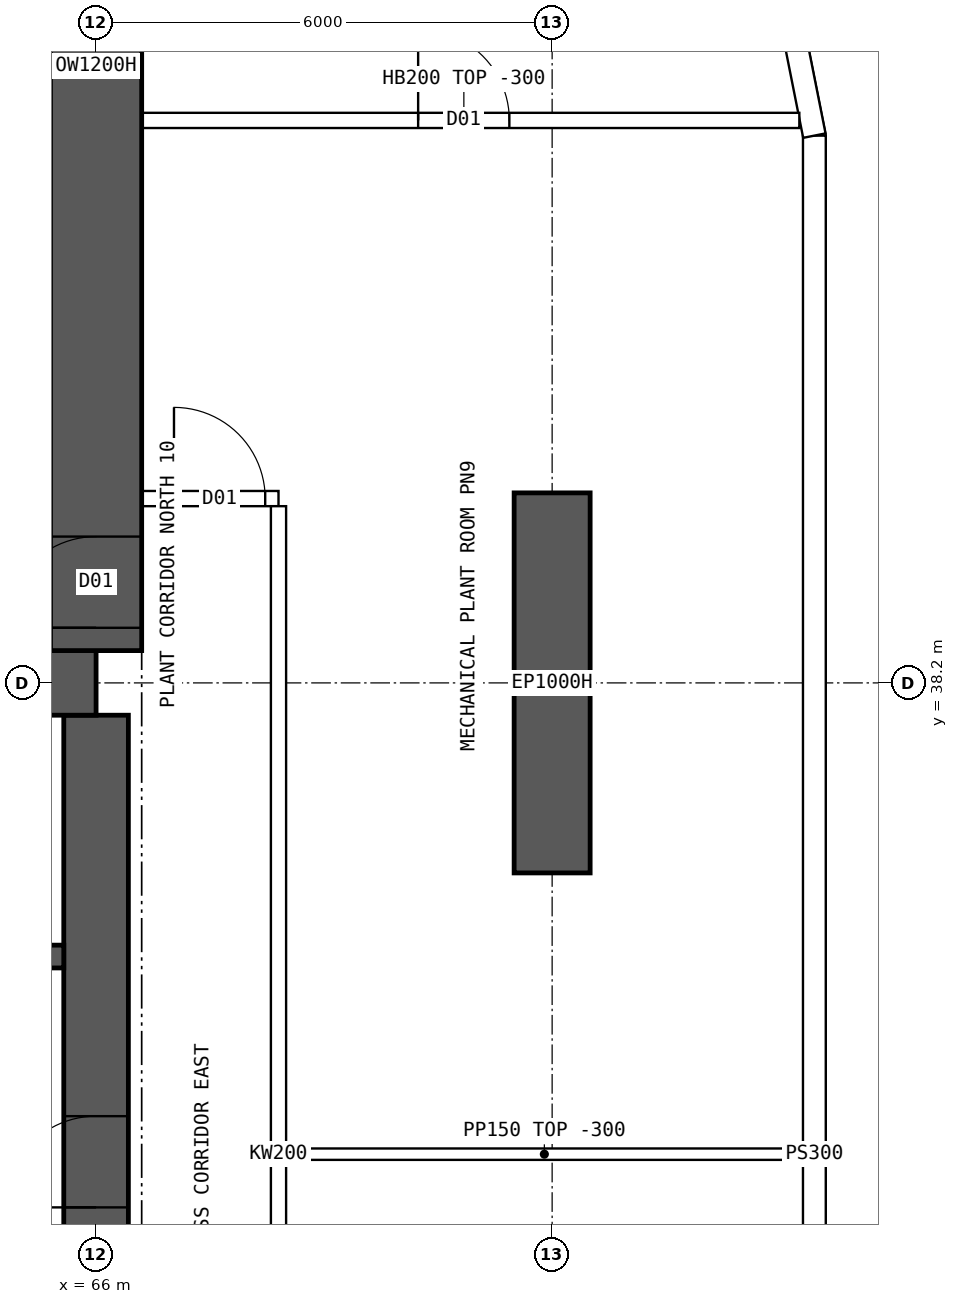
"""IFC4 building model, lengths in metres.
Left out: names, types, materials, properties, quantities, classifications, styles, units other than length and angle.
Written with IfcOpenShell. Run it as: python <this file> out.ifc"""

import sys

from ifc_helpers import new_model, si_unit, direction, frame, frame_2d, origin, place, context, subcontext, project, spatial, polyline, rectangle, outline, extrude, clip, halfspace, element, fill, save


model = new_model("IFC4")
c1 = context("Model", 3, precision=1e-05, world=origin(), true_north=direction((0.0, 1.0)))
c2 = subcontext(c1, "Body", "Model", "MODEL_VIEW")
j1 = project(units=[si_unit("LENGTHUNIT", "METRE"), si_unit("PLANEANGLEUNIT", "RADIAN")], contexts=[c1])
p1 = place(None, origin())
s1 = spatial("IfcSite", under=j1, at=p1, CompositionType="ELEMENT")
p2 = place(p1, origin())
s2 = spatial("IfcBuilding", under=s1, at=p2, CompositionType="ELEMENT")
p3 = place(p2, frame((0.0, 0.0, 201.1)))
s3 = spatial("IfcBuildingStorey", under=s2, at=p3, CompositionType="ELEMENT", Elevation=201.1)
p4 = place(p3, frame((72.0, 35.7, 0.0), z_axis=(0.0, 0.0, 1.0), x_axis=(0.0, 1.0, 0.0)))
e1 = element("IfcWall", 1, at=p4, inside=s3, PredefinedType="SHEAR", context=c2, shape_type="SweptSolid", body=[
    extrude(rectangle(XDim=5.0, YDim=1.0, at=frame_2d((2.5, 0.0))), origin(), (0.0, 0.0, 1.0), 7.2),
])
p5 = place(p3, frame((18.0, 38.2, 0.0), z_axis=(0.0, 0.0, 1.0), x_axis=(1.0, 0.0, 0.0)))
e2 = element("IfcWall", 2, at=p5, inside=s3, PredefinedType="SHEAR", context=c2, shape_type="SweptSolid", body=[
    extrude(rectangle(XDim=48.0, YDim=0.85, at=frame_2d((24.0, 0.0))), origin(), (0.0, 0.0, 1.0), 7.2),
])
p6 = place(p3, frame((66.0, 26.225, 0.0), z_axis=(0.0, 0.0, 1.0), x_axis=(0.0, 1.0, 0.0)))
e3 = element("IfcWall", 3, at=p6, inside=s3, PredefinedType="SHEAR", context=c2, shape_type="SweptSolid", body=[
    extrude(rectangle(XDim=11.55, YDim=0.85, at=frame_2d((5.775, 0.0))), origin(), (0.0, 0.0, 1.0), 7.2),
])
p7 = place(p6, frame((5.075, 0.0, 0.0)))
e4 = element("IfcOpeningElement", 4, at=p7, cuts=e3, PredefinedType="OPENING", context=c2, shape_type="SweptSolid", body=[
    extrude(rectangle(XDim=1.2, YDim=2.1, at=frame_2d((0.6, 1.05))), frame((0.0, 0.435, 0.0), z_axis=(0.0, -1.0, 0.0), x_axis=(1.0, 0.0, 0.0)), (0.0, 0.0, 1.0), 0.87),
])
p8 = place(p3, frame((18.425, 34.6, 0.0), z_axis=(0.0, 0.0, 1.0), x_axis=(1.0, 0.0, 0.0)))
e5 = element("IfcWall", 5, at=p8, inside=s3, PredefinedType="SHEAR", context=c2, shape_type="SweptSolid", body=[
    extrude(rectangle(XDim=47.15, YDim=0.3, at=frame_2d((23.575, 0.0))), origin(), (0.0, 0.0, 1.0), 7.2),
])
p9 = place(p8, frame((0.9, 0.0, 0.0)))
e6 = element("IfcOpeningElement", 6, at=p9, cuts=e5, PredefinedType="OPENING", context=c2, shape_type="SweptSolid", body=[
    extrude(rectangle(XDim=1.1, YDim=2.1, at=frame_2d((0.55, 1.05))), frame((0.0, 0.16, 0.0), z_axis=(0.0, -1.0, 0.0), x_axis=(1.0, 0.0, 0.0)), (0.0, 0.0, 1.0), 0.32),
])
p10 = place(p8, frame((45.15, 0.0, 0.0)))
e7 = element("IfcOpeningElement", 7, at=p10, cuts=e5, PredefinedType="OPENING", context=c2, shape_type="SweptSolid", body=[
    extrude(rectangle(XDim=1.1, YDim=2.1, at=frame_2d((0.55, 1.05))), frame((0.0, 0.16, 0.0), z_axis=(0.0, -1.0, 0.0), x_axis=(1.0, 0.0, 0.0)), (0.0, 0.0, 1.0), 0.32),
])
p11 = place(p8, frame((4.175, 0.0, 0.0)))
e8 = element("IfcOpeningElement", 8, at=p11, cuts=e5, PredefinedType="OPENING", context=c2, shape_type="SweptSolid", body=[
    extrude(rectangle(XDim=0.9, YDim=2.1, at=frame_2d((0.45, 1.05))), frame((0.0, 0.16, 0.0), z_axis=(0.0, -1.0, 0.0), x_axis=(1.0, 0.0, 0.0)), (0.0, 0.0, 1.0), 0.32),
])
p12 = place(p8, frame((42.075, 0.0, 0.0)))
e9 = element("IfcOpeningElement", 9, at=p12, cuts=e5, PredefinedType="OPENING", context=c2, shape_type="SweptSolid", body=[
    extrude(rectangle(XDim=0.9, YDim=2.1, at=frame_2d((0.45, 1.05))), frame((0.0, 0.16, 0.0), z_axis=(0.0, -1.0, 0.0), x_axis=(1.0, 0.0, 0.0)), (0.0, 0.0, 1.0), 0.32),
])
p13 = place(p8, frame((8.95, 0.0, 0.0)))
e10 = element("IfcOpeningElement", 10, at=p13, cuts=e5, PredefinedType="OPENING", context=c2, shape_type="SweptSolid", body=[
    extrude(rectangle(XDim=0.9, YDim=2.1, at=frame_2d((0.45, 1.05))), frame((0.0, 0.16, 0.0), z_axis=(0.0, -1.0, 0.0), x_axis=(1.0, 0.0, 0.0)), (0.0, 0.0, 1.0), 0.32),
])
p14 = place(p8, frame((12.924, 0.0, 0.0)))
e11 = element("IfcOpeningElement", 11, at=p14, cuts=e5, PredefinedType="OPENING", context=c2, shape_type="SweptSolid", body=[
    extrude(rectangle(XDim=0.9, YDim=2.1, at=frame_2d((0.45, 1.05))), frame((0.0, 0.16, 0.0), z_axis=(0.0, -1.0, 0.0), x_axis=(1.0, 0.0, 0.0)), (0.0, 0.0, 1.0), 0.32),
])
p15 = place(p8, frame((16.571, 0.0, 0.0)))
e12 = element("IfcOpeningElement", 12, at=p15, cuts=e5, PredefinedType="OPENING", context=c2, shape_type="SweptSolid", body=[
    extrude(rectangle(XDim=0.9, YDim=2.1, at=frame_2d((0.45, 1.05))), frame((0.0, 0.16, 0.0), z_axis=(0.0, -1.0, 0.0), x_axis=(1.0, 0.0, 0.0)), (0.0, 0.0, 1.0), 0.32),
])
p16 = place(p8, frame((20.33, 0.0, 0.0)))
e13 = element("IfcOpeningElement", 13, at=p16, cuts=e5, PredefinedType="OPENING", context=c2, shape_type="SweptSolid", body=[
    extrude(rectangle(XDim=0.9, YDim=2.1, at=frame_2d((0.45, 1.05))), frame((0.0, 0.16, 0.0), z_axis=(0.0, -1.0, 0.0), x_axis=(1.0, 0.0, 0.0)), (0.0, 0.0, 1.0), 0.32),
])
p17 = place(p8, frame((24.736, 0.0, 0.0)))
e14 = element("IfcOpeningElement", 14, at=p17, cuts=e5, PredefinedType="OPENING", context=c2, shape_type="SweptSolid", body=[
    extrude(rectangle(XDim=0.9, YDim=2.1, at=frame_2d((0.45, 1.05))), frame((0.0, 0.16, 0.0), z_axis=(0.0, -1.0, 0.0), x_axis=(1.0, 0.0, 0.0)), (0.0, 0.0, 1.0), 0.32),
])
p18 = place(p8, frame((27.533, 0.0, 0.0)))
e15 = element("IfcOpeningElement", 15, at=p18, cuts=e5, PredefinedType="OPENING", context=c2, shape_type="SweptSolid", body=[
    extrude(rectangle(XDim=0.9, YDim=2.1, at=frame_2d((0.45, 1.05))), frame((0.0, 0.16, 0.0), z_axis=(0.0, -1.0, 0.0), x_axis=(1.0, 0.0, 0.0)), (0.0, 0.0, 1.0), 0.32),
])
p19 = place(p8, frame((29.906, 0.0, 0.0)))
e16 = element("IfcOpeningElement", 16, at=p19, cuts=e5, PredefinedType="OPENING", context=c2, shape_type="SweptSolid", body=[
    extrude(rectangle(XDim=0.9, YDim=2.1, at=frame_2d((0.45, 1.05))), frame((0.0, 0.16, 0.0), z_axis=(0.0, -1.0, 0.0), x_axis=(1.0, 0.0, 0.0)), (0.0, 0.0, 1.0), 0.32),
])
p20 = place(p8, frame((35.376, 0.0, 0.0)))
e17 = element("IfcOpeningElement", 17, at=p20, cuts=e5, PredefinedType="OPENING", context=c2, shape_type="SweptSolid", body=[
    extrude(rectangle(XDim=0.9, YDim=2.1, at=frame_2d((0.45, 1.05))), frame((0.0, 0.16, 0.0), z_axis=(0.0, -1.0, 0.0), x_axis=(1.0, 0.0, 0.0)), (0.0, 0.0, 1.0), 0.32),
])
p21 = place(p3, frame((66.0, 38.625, 0.0), z_axis=(0.0, 0.0, 1.0), x_axis=(0.0, 1.0, 0.0)))
e18 = element("IfcWall", 18, at=p21, inside=s3, PredefinedType="SHEAR", context=c2, shape_type="SweptSolid", body=[
    extrude(rectangle(XDim=15.375, YDim=1.2, at=frame_2d((7.688, 0.0))), origin(), (0.0, 0.0, 1.0), 7.2),
])
p22 = place(p21, frame((0.3, 0.0, 0.0)))
e19 = element("IfcOpeningElement", 19, at=p22, cuts=e18, PredefinedType="OPENING", context=c2, shape_type="SweptSolid", body=[
    extrude(rectangle(XDim=1.2, YDim=2.1, at=frame_2d((0.6, 1.05))), frame((0.0, 0.61, 0.0), z_axis=(0.0, -1.0, 0.0), x_axis=(1.0, 0.0, 0.0)), (0.0, 0.0, 1.0), 1.22),
])
p23 = place(p21, frame((10.225, 0.0, 0.0)))
e20 = element("IfcOpeningElement", 20, at=p23, cuts=e18, PredefinedType="OPENING", context=c2, shape_type="SweptSolid", body=[
    extrude(rectangle(XDim=1.2, YDim=2.1, at=frame_2d((0.6, 1.05))), frame((0.0, 0.61, 0.0), z_axis=(0.0, -1.0, 0.0), x_axis=(1.0, 0.0, 0.0)), (0.0, 0.0, 1.0), 1.22),
])
p24 = place(p3, frame((75.45, 18.6, 0.0), z_axis=(0.0, 0.0, 1.0), x_axis=(0.0, 1.0, 0.0)))
e21 = element("IfcWall", 21, at=p24, inside=s3, PredefinedType="SOLIDWALL", context=c2, shape_type="SweptSolid", body=[
    extrude(outline(polyline([(-0.015, -0.15), (26.815, -0.15), (26.785, 0.15), (0.015, 0.15), (-0.015, -0.15)])), origin(), (0.0, 0.0, 1.0), 6.9),
])
p25 = place(p3, frame((75.45, 45.4, 0.0), z_axis=(0.0, 0.0, 1.0), x_axis=(-0.19508664885, 0.980786011034, 0.0)))
e22 = element("IfcWall", 22, at=p25, inside=s3, PredefinedType="SOLIDWALL", context=c2, shape_type="SweptSolid", body=[
    extrude(outline(polyline([(-0.015, -0.15), (3.405, -0.15), (3.345, 0.15), (0.015, 0.15), (-0.015, -0.15)])), origin(), (0.0, 0.0, 1.0), 6.9),
])
p26 = place(p3, frame((15.6, 40.625, 0.0), z_axis=(0.0, 0.0, 1.0), x_axis=(1.0, 0.0, 0.0)))
e23 = element("IfcWall", 23, at=p26, inside=s3, PredefinedType="SOLIDWALL", context=c2, shape_type="SweptSolid", body=[
    extrude(rectangle(XDim=52.8, YDim=0.2, at=frame_2d((26.4, 0.0))), origin(), (0.0, 0.0, 1.0), 6.9),
])
p27 = place(p26, frame((0.6, 0.0, 0.0)))
e24 = element("IfcOpeningElement", 24, at=p27, cuts=e23, PredefinedType="OPENING", context=c2, shape_type="SweptSolid", body=[
    extrude(rectangle(XDim=1.2, YDim=2.1, at=frame_2d((0.6, 1.05))), frame((0.0, 0.11, 0.0), z_axis=(0.0, -1.0, 0.0), x_axis=(1.0, 0.0, 0.0)), (0.0, 0.0, 1.0), 0.22),
])
p28 = place(p26, frame((3.425, 0.0, 0.0)))
e25 = element("IfcOpeningElement", 25, at=p28, cuts=e23, PredefinedType="OPENING", context=c2, shape_type="SweptSolid", body=[
    extrude(rectangle(XDim=1.8, YDim=2.4, at=frame_2d((0.9, 1.2))), frame((0.0, 0.11, 0.0), z_axis=(0.0, -1.0, 0.0), x_axis=(1.0, 0.0, 0.0)), (0.0, 0.0, 1.0), 0.22),
])
p29 = place(p26, frame((9.425, 0.0, 0.0)))
e26 = element("IfcOpeningElement", 26, at=p29, cuts=e23, PredefinedType="OPENING", context=c2, shape_type="SweptSolid", body=[
    extrude(rectangle(XDim=1.8, YDim=2.4, at=frame_2d((0.9, 1.2))), frame((0.0, 0.11, 0.0), z_axis=(0.0, -1.0, 0.0), x_axis=(1.0, 0.0, 0.0)), (0.0, 0.0, 1.0), 0.22),
])
p30 = place(p26, frame((15.425, 0.0, 0.0)))
e27 = element("IfcOpeningElement", 27, at=p30, cuts=e23, PredefinedType="OPENING", context=c2, shape_type="SweptSolid", body=[
    extrude(rectangle(XDim=1.8, YDim=2.4, at=frame_2d((0.9, 1.2))), frame((0.0, 0.11, 0.0), z_axis=(0.0, -1.0, 0.0), x_axis=(1.0, 0.0, 0.0)), (0.0, 0.0, 1.0), 0.22),
])
p31 = place(p26, frame((21.425, 0.0, 0.0)))
e28 = element("IfcOpeningElement", 28, at=p31, cuts=e23, PredefinedType="OPENING", context=c2, shape_type="SweptSolid", body=[
    extrude(rectangle(XDim=1.8, YDim=2.4, at=frame_2d((0.9, 1.2))), frame((0.0, 0.11, 0.0), z_axis=(0.0, -1.0, 0.0), x_axis=(1.0, 0.0, 0.0)), (0.0, 0.0, 1.0), 0.22),
])
p32 = place(p26, frame((27.425, 0.0, 0.0)))
e29 = element("IfcOpeningElement", 29, at=p32, cuts=e23, PredefinedType="OPENING", context=c2, shape_type="SweptSolid", body=[
    extrude(rectangle(XDim=1.8, YDim=2.4, at=frame_2d((0.9, 1.2))), frame((0.0, 0.11, 0.0), z_axis=(0.0, -1.0, 0.0), x_axis=(1.0, 0.0, 0.0)), (0.0, 0.0, 1.0), 0.22),
])
p33 = place(p26, frame((33.425, 0.0, 0.0)))
e30 = element("IfcOpeningElement", 30, at=p33, cuts=e23, PredefinedType="OPENING", context=c2, shape_type="SweptSolid", body=[
    extrude(rectangle(XDim=1.8, YDim=2.4, at=frame_2d((0.9, 1.2))), frame((0.0, 0.11, 0.0), z_axis=(0.0, -1.0, 0.0), x_axis=(1.0, 0.0, 0.0)), (0.0, 0.0, 1.0), 0.22),
])
p34 = place(p26, frame((39.425, 0.0, 0.0)))
e31 = element("IfcOpeningElement", 31, at=p34, cuts=e23, PredefinedType="OPENING", context=c2, shape_type="SweptSolid", body=[
    extrude(rectangle(XDim=1.8, YDim=2.4, at=frame_2d((0.9, 1.2))), frame((0.0, 0.11, 0.0), z_axis=(0.0, -1.0, 0.0), x_axis=(1.0, 0.0, 0.0)), (0.0, 0.0, 1.0), 0.22),
])
p35 = place(p26, frame((45.425, 0.0, 0.0)))
e32 = element("IfcOpeningElement", 32, at=p35, cuts=e23, PredefinedType="OPENING", context=c2, shape_type="SweptSolid", body=[
    extrude(rectangle(XDim=1.8, YDim=2.4, at=frame_2d((0.9, 1.2))), frame((0.0, 0.11, 0.0), z_axis=(0.0, -1.0, 0.0), x_axis=(1.0, 0.0, 0.0)), (0.0, 0.0, 1.0), 0.22),
])
p36 = place(p26, frame((51.425, 0.0, 0.0)))
e33 = element("IfcOpeningElement", 33, at=p36, cuts=e23, PredefinedType="OPENING", context=c2, shape_type="SweptSolid", body=[
    extrude(rectangle(XDim=1.2, YDim=2.1, at=frame_2d((0.6, 1.05))), frame((0.0, 0.11, 0.0), z_axis=(0.0, -1.0, 0.0), x_axis=(1.0, 0.0, 0.0)), (0.0, 0.0, 1.0), 0.22),
])
p37 = place(p3, frame((68.4, 23.475, 0.0), z_axis=(0.0, 0.0, 1.0), x_axis=(0.0, 1.0, 0.0)))
e34 = element("IfcWall", 34, at=p37, inside=s3, PredefinedType="SOLIDWALL", context=c2, shape_type="SweptSolid", body=[
    extrude(rectangle(XDim=17.05, YDim=0.2, at=frame_2d((8.525, 0.0))), origin(), (0.0, 0.0, 1.0), 6.9),
])
p38 = place(p3, frame((60.425, 45.6, 0.0), z_axis=(0.0, 0.0, 1.0), x_axis=(1.0, 0.0, 0.0)))
e35 = element("IfcWall", 35, at=p38, inside=s3, PredefinedType="SOLIDWALL", context=c2, shape_type="SweptSolid", body=[
    extrude(rectangle(XDim=5.15, YDim=0.2, at=frame_2d((2.575, 0.0))), origin(), (0.0, 0.0, 1.0), 6.9),
])
p39 = place(p38, frame((1.975, 0.0, 0.0)))
e36 = element("IfcOpeningElement", 36, at=p39, cuts=e35, PredefinedType="OPENING", context=c2, shape_type="SweptSolid", body=[
    extrude(rectangle(XDim=1.2, YDim=2.1, at=frame_2d((0.6, 1.05))), frame((0.0, 0.11, 0.0), z_axis=(0.0, -1.0, 0.0), x_axis=(1.0, 0.0, 0.0)), (0.0, 0.0, 1.0), 0.22),
])
p40 = place(p3, frame((66.425, 45.6, 0.0), z_axis=(0.0, 0.0, 1.0), x_axis=(1.0, 0.0, 0.0)))
e37 = element("IfcWall", 37, at=p40, inside=s3, PredefinedType="SOLIDWALL", context=c2, shape_type="Clipping", body=[
    clip(clip(extrude(outline(polyline([(-0.03, 0.0), (8.857, 0.0), (8.857, 6.9), (5.877, 6.9), (5.875, 6.45), (5.277, 6.45), (5.275, 6.9), (-0.03, 6.9), (-0.03, 0.0)])), frame((0.0, 0.1, 0.0), z_axis=(0.0, -1.0, 0.0), x_axis=(1.0, 0.0, 0.0)), (0.0, 0.0, 1.0), 0.2), halfspace(frame((0.0, 0.0, 0.0), z_axis=(-1.0, 0.0, 0.0)), False)), halfspace(frame((8.827, 0.0, 0.0), z_axis=(0.980787601265, 0.195078653892, 0.0)), False)),
])
p41 = place(p40, frame((3.812, 0.0, 0.0)))
e38 = element("IfcOpeningElement", 38, at=p41, cuts=e37, PredefinedType="OPENING", context=c2, shape_type="SweptSolid", body=[
    extrude(rectangle(XDim=1.2, YDim=2.1, at=frame_2d((0.6, 1.05))), frame((0.0, 0.11, 0.0), z_axis=(0.0, -1.0, 0.0), x_axis=(1.0, 0.0, 0.0)), (0.0, 0.0, 1.0), 0.22),
])
p42 = place(p3, frame((68.5, 32.0, 0.0), z_axis=(0.0, 0.0, 1.0), x_axis=(1.0, 0.0, 0.0)))
e39 = element("IfcWall", 39, at=p42, inside=s3, PredefinedType="PARTITIONING", context=c2, shape_type="SweptSolid", body=[
    extrude(outline(polyline([(0.0, 0.0), (6.795, 0.0), (6.795, 6.9), (3.802, 6.9), (3.8, 6.45), (3.202, 6.45), (3.2, 6.9), (0.0, 6.9), (0.0, 0.0)])), frame((0.0, 0.075, 0.0), z_axis=(0.0, -1.0, 0.0), x_axis=(1.0, 0.0, 0.0)), (0.0, 0.0, 1.0), 0.15),
])
p43 = place(p7, origin())
e40 = element("IfcDoor", 40, at=p43, inside=s3, OperationType="SINGLE_SWING_LEFT", PredefinedType="DOOR", context=c2, shape_type="SweptSolid", body=[
    extrude(rectangle(XDim=1.2, YDim=2.1, at=frame_2d((0.6, 1.05))), frame((0.0, 0.025, 0.0), z_axis=(0.0, -1.0, 0.0), x_axis=(1.0, 0.0, 0.0)), (0.0, 0.0, 1.0), 0.05),
])
fill(e4, e40)
p44 = place(p41, origin())
e41 = element("IfcDoor", 41, at=p44, inside=s3, OperationType="SINGLE_SWING_LEFT", PredefinedType="DOOR", context=c2, shape_type="SweptSolid", body=[
    extrude(rectangle(XDim=1.2, YDim=2.1, at=frame_2d((0.6, 1.05))), frame((0.0, 0.025, 0.0), z_axis=(0.0, -1.0, 0.0), x_axis=(1.0, 0.0, 0.0)), (0.0, 0.0, 1.0), 0.05),
])
fill(e38, e41)
p45 = place(p36, origin())
e42 = element("IfcDoor", 42, at=p45, inside=s3, OperationType="SINGLE_SWING_LEFT", PredefinedType="DOOR", context=c2, shape_type="SweptSolid", body=[
    extrude(rectangle(XDim=1.2, YDim=2.1, at=frame_2d((0.6, 1.05))), frame((0.0, 0.025, 0.0), z_axis=(0.0, -1.0, 0.0), x_axis=(1.0, 0.0, 0.0)), (0.0, 0.0, 1.0), 0.05),
])
fill(e33, e42)
p46 = place(p22, origin())
e43 = element("IfcDoor", 43, at=p46, inside=s3, OperationType="SINGLE_SWING_LEFT", PredefinedType="DOOR", context=c2, shape_type="SweptSolid", body=[
    extrude(rectangle(XDim=1.2, YDim=2.1, at=frame_2d((0.6, 1.05))), frame((0.0, 0.025, 0.0), z_axis=(0.0, -1.0, 0.0), x_axis=(1.0, 0.0, 0.0)), (0.0, 0.0, 1.0), 0.05),
])
fill(e19, e43)
save(model, sys.argv[1])
